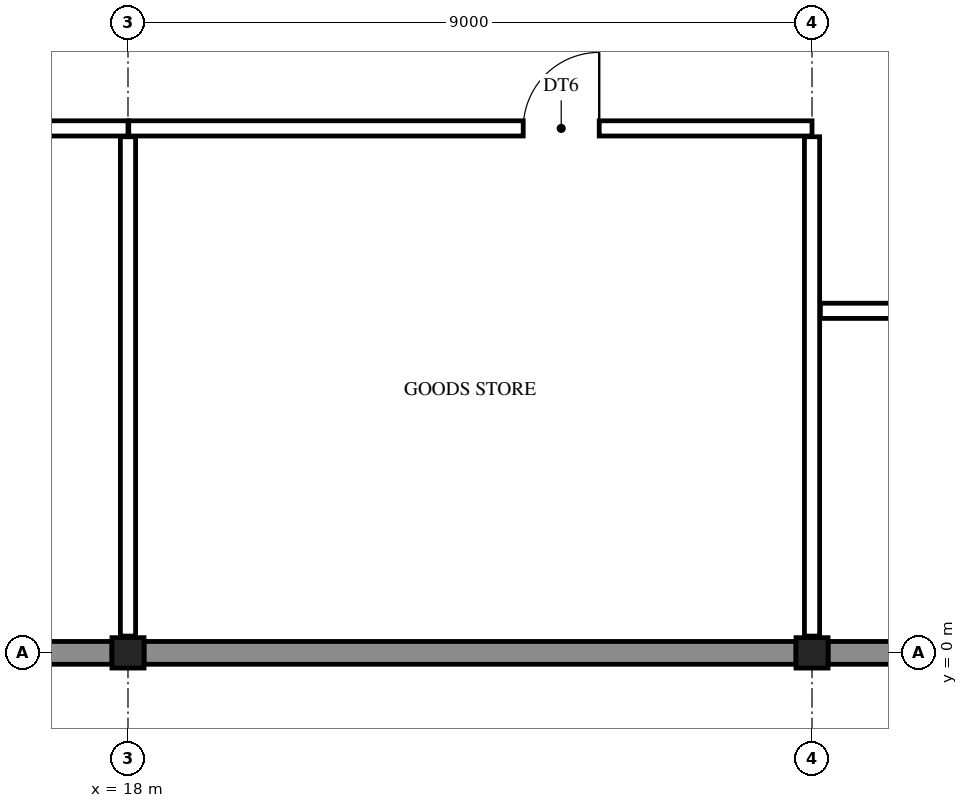
"""IFC4 building model, lengths in metres.
Left out: names, types, materials, properties, quantities, classifications, styles, units other than length and angle.
Written with IfcOpenShell. Run it as: python <this file> out.ifc"""

import sys

from ifc_helpers import new_model, si_unit, direction, frame, frame_2d, origin, origin_2d, place, context, subcontext, project, spatial, rectangle, i_section, extrude, element, fill, save


model = new_model("IFC4")
c1 = context("Model", 3, precision=1e-05, world=origin(), true_north=direction((0.0, 1.0)))
c2 = subcontext(c1, "Body", "Model", "MODEL_VIEW")
j1 = project(units=[si_unit("LENGTHUNIT", "METRE"), si_unit("PLANEANGLEUNIT", "RADIAN")], contexts=[c1])
p1 = place(None, origin())
s1 = spatial("IfcSite", under=j1, at=p1, CompositionType="ELEMENT")
p2 = place(p1, origin())
s2 = spatial("IfcBuilding", under=s1, at=p2, CompositionType="ELEMENT")
p3 = place(p2, frame((0.0, 0.0, -5.0)))
s3 = spatial("IfcBuildingStorey", under=s2, at=p3, CompositionType="ELEMENT", Elevation=-5.0)
for number, where, z_axis, x_axis in (
    (1, (18.0, 0.0, -0.4), (0.0, 0.0, 1.0), (0.0, 1.0, 0.0)),
    (2, (27.0, 0.0, -0.4), (0.0, 0.0, 1.0), (0.0, 1.0, 0.0)),
):
    element("IfcColumn", number, at=place(p3, frame(where, z_axis=z_axis, x_axis=x_axis)), inside=s3, PredefinedType="COLUMN", context=c2, shape_type="SweptSolid", body=[
        extrude(i_section(OverallWidth=0.4, OverallDepth=0.422, WebThickness=0.028, FlangeThickness=0.036, at=origin_2d()), origin(), (0.0, 0.0, 1.0), 5.4),
    ])
p4 = place(p3, frame((31.3, 0.0, 0.0), z_axis=(0.0, 0.0, 1.0), x_axis=(-1.0, 0.0, 0.0)))
e3 = element("IfcWall", 3, at=p4, inside=s3, PredefinedType="SOLIDWALL", context=c2, shape_type="SweptSolid", body=[
    extrude(rectangle(XDim=4.089, YDim=0.3, at=frame_2d((2.044, 0.0))), origin(), (0.0, 0.0, 1.0), 5.0),
])
for number, where, z_axis, x_axis in (
    (4, (26.789, 0.0, 0.0), (0.0, 0.0, 1.0), (-1.0, 0.0, 0.0)),
    (5, (17.789, 0.0, 0.0), (0.0, 0.0, 1.0), (-1.0, 0.0, 0.0)),
):
    element("IfcWall", number, at=place(p3, frame(where, z_axis=z_axis, x_axis=x_axis)), inside=s3, PredefinedType="SOLIDWALL", context=c2, shape_type="SweptSolid", body=[
        extrude(rectangle(XDim=8.578, YDim=0.3, at=frame_2d((4.289, 0.0))), origin(), (0.0, 0.0, 1.0), 5.0),
    ])
for number, where, z_axis, x_axis in (
    (6, (18.0, 0.221, 0.0), (0.0, 0.0, 1.0), (0.0, 1.0, 0.0)),
    (7, (27.0, 0.221, 0.0), (0.0, 0.0, 1.0), (0.0, 1.0, 0.0)),
):
    element("IfcWall", number, at=place(p3, frame(where, z_axis=z_axis, x_axis=x_axis)), inside=s3, PredefinedType="PARTITIONING", context=c2, shape_type="SweptSolid", body=[
        extrude(rectangle(XDim=6.569, YDim=0.2, at=frame_2d((3.285, 0.0))), origin(), (0.0, 0.0, 1.0), 4.267),
    ])
p5 = place(p3, frame((27.11, 4.5, 0.0), z_axis=(0.0, 0.0, 1.0), x_axis=(1.0, 0.0, 0.0)))
e8 = element("IfcWall", 8, at=p5, inside=s3, PredefinedType="PARTITIONING", context=c2, shape_type="SweptSolid", body=[
    extrude(rectangle(XDim=4.23, YDim=0.2, at=frame_2d((2.115, 0.0))), origin(), (0.0, 0.0, 1.0), 4.496),
])
p6 = place(p5, frame((1.64, 0.0, 0.0)))
e9 = element("IfcOpeningElement", 9, at=p6, cuts=e8, PredefinedType="OPENING", context=c2, shape_type="SweptSolid", body=[
    extrude(rectangle(XDim=1.0, YDim=2.1, at=frame_2d((0.5, 1.05))), frame((0.0, 0.11, 0.0), z_axis=(0.0, -1.0, 0.0), x_axis=(1.0, 0.0, 0.0)), (0.0, 0.0, 1.0), 0.22),
])
p7 = place(p3, frame((6.9, 6.9, 0.0), z_axis=(0.0, 0.0, 1.0), x_axis=(1.0, 0.0, 0.0)))
e10 = element("IfcWall", 10, at=p7, inside=s3, PredefinedType="PARTITIONING", context=c2, shape_type="SweptSolid", body=[
    extrude(rectangle(XDim=11.1, YDim=0.2, at=frame_2d((5.55, 0.0))), origin(), (0.0, 0.0, 1.0), 4.267),
])
p8 = place(p7, frame((0.15, 0.0, 0.0)))
e11 = element("IfcOpeningElement", 11, at=p8, cuts=e10, PredefinedType="OPENING", context=c2, shape_type="SweptSolid", body=[
    extrude(rectangle(XDim=1.8, YDim=2.1, at=frame_2d((0.9, 1.05))), frame((0.0, 0.11, 0.0), z_axis=(0.0, -1.0, 0.0), x_axis=(1.0, 0.0, 0.0)), (0.0, 0.0, 1.0), 0.22),
])
p9 = place(p7, frame((5.7, 0.0, 0.0)))
e12 = element("IfcOpeningElement", 12, at=p9, cuts=e10, PredefinedType="OPENING", context=c2, shape_type="SweptSolid", body=[
    extrude(rectangle(XDim=1.8, YDim=2.1, at=frame_2d((0.9, 1.05))), frame((0.0, 0.11, 0.0), z_axis=(0.0, -1.0, 0.0), x_axis=(1.0, 0.0, 0.0)), (0.0, 0.0, 1.0), 0.22),
])
p10 = place(p3, frame((18.01, 6.9, 0.0), z_axis=(0.0, 0.0, 1.0), x_axis=(1.0, 0.0, 0.0)))
e13 = element("IfcWall", 13, at=p10, inside=s3, PredefinedType="PARTITIONING", context=c2, shape_type="SweptSolid", body=[
    extrude(rectangle(XDim=8.99, YDim=0.2, at=frame_2d((4.495, 0.0))), origin(), (0.0, 0.0, 1.0), 4.267),
])
p11 = place(p10, frame((5.19, 0.0, 0.0)))
e14 = element("IfcOpeningElement", 14, at=p11, cuts=e13, PredefinedType="OPENING", context=c2, shape_type="SweptSolid", body=[
    extrude(rectangle(XDim=1.0, YDim=2.1, at=frame_2d((0.5, 1.05))), frame((0.0, 0.11, 0.0), z_axis=(0.0, -1.0, 0.0), x_axis=(1.0, 0.0, 0.0)), (0.0, 0.0, 1.0), 0.22),
])
p12 = place(p11, frame((1.0, 0.0, 0.0), z_axis=(0.0, 0.0, 1.0), x_axis=(-1.0, 0.0, 0.0)))
e15 = element("IfcDoor", 15, at=p12, inside=s3, OperationType="SINGLE_SWING_RIGHT", PredefinedType="DOOR", context=c2, shape_type="SweptSolid", body=[
    extrude(rectangle(XDim=1.0, YDim=2.1, at=frame_2d((0.5, 1.05))), frame((0.0, 0.025, 0.0), z_axis=(0.0, -1.0, 0.0), x_axis=(1.0, 0.0, 0.0)), (0.0, 0.0, 1.0), 0.05),
])
fill(e14, e15)
save(model, sys.argv[1])
